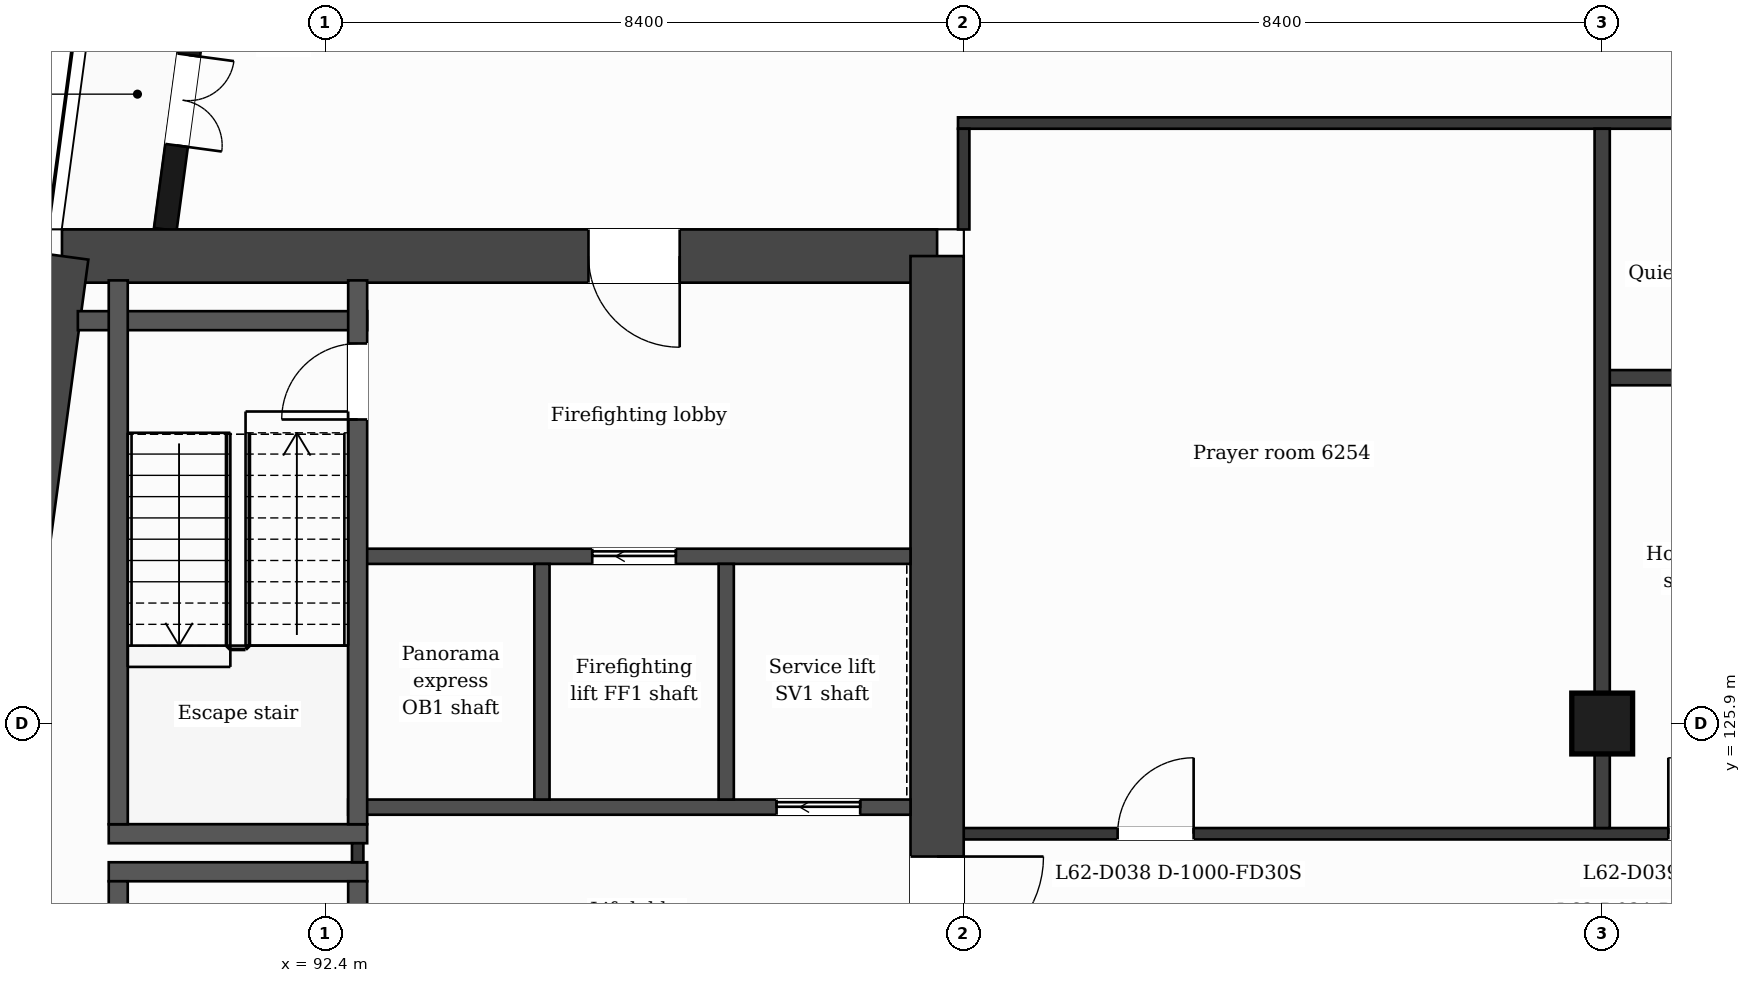
"""IFC4 building model, lengths in metres.
Left out: names, types, materials, properties, quantities, classifications, styles, units other than length and angle.
Written with IfcOpenShell. Run it as: python <this file> out.ifc"""

import sys

from ifc_helpers import new_model, si_unit, direction, frame, frame_2d, origin, origin_2d, place, context, subcontext, project, spatial, rectangle, extrude, element, fill, save


model = new_model("IFC4")
c1 = context("Model", 3, precision=1e-05, world=origin(), true_north=direction((0.0, 1.0)))
c2 = subcontext(c1, "Body", "Model", "MODEL_VIEW")
j1 = project(units=[si_unit("LENGTHUNIT", "METRE"), si_unit("PLANEANGLEUNIT", "RADIAN")], contexts=[c1])
p1 = place(None, origin())
s1 = spatial("IfcSite", under=j1, at=p1, CompositionType="ELEMENT")
p2 = place(p1, origin())
s2 = spatial("IfcBuilding", under=s1, at=p2, CompositionType="ELEMENT")
p3 = place(p2, frame((0.0, 0.0, 259.0)))
s3 = spatial("IfcBuildingStorey", under=s2, at=p3, CompositionType="ELEMENT", Elevation=259.0)
p4 = place(p3, frame((88.937, 132.05, 0.0), z_axis=(0.0, 0.0, 1.0), x_axis=(1.0, 0.0, 0.0)))
e1 = element("IfcWall", 1, at=p4, inside=s3, PredefinedType="SHEAR", context=c2, shape_type="SweptSolid", body=[
    extrude(rectangle(XDim=11.513, YDim=0.7, at=frame_2d((5.757, 0.0))), origin(), (0.0, 0.0, 1.0), 3.7),
])
p5 = place(p4, frame((6.927, 0.0, 0.0)))
e2 = element("IfcOpeningElement", 2, at=p5, cuts=e1, PredefinedType="OPENING", context=c2, shape_type="SweptSolid", body=[
    extrude(rectangle(XDim=1.2, YDim=2.1, at=frame_2d((0.6, 1.05))), frame((0.0, 0.36, 0.0), z_axis=(0.0, -1.0, 0.0), x_axis=(1.0, 0.0, 0.0)), (0.0, 0.0, 1.0), 0.72),
])
p6 = place(p3, frame((100.45, 132.05, 0.0), z_axis=(0.0, 0.0, 1.0), x_axis=(0.0, -1.0, 0.0)))
e3 = element("IfcWall", 3, at=p6, inside=s3, PredefinedType="SHEAR", context=c2, shape_type="SweptSolid", body=[
    extrude(rectangle(XDim=21.3, YDim=0.7, at=frame_2d((10.65, 0.0))), origin(), (0.0, 0.0, 1.0), 3.7),
])
p7 = place(p6, frame((7.9, 0.0, 0.0)))
e4 = element("IfcOpeningElement", 4, at=p7, cuts=e3, PredefinedType="OPENING", context=c2, shape_type="SweptSolid", body=[
    extrude(rectangle(XDim=1.4, YDim=2.1, at=frame_2d((0.7, 1.05))), frame((0.0, 0.36, 0.0), z_axis=(0.0, -1.0, 0.0), x_axis=(1.0, 0.0, 0.0)), (0.0, 0.0, 1.0), 0.72),
])
p8 = place(p3, frame((86.07, 110.75, 0.0), z_axis=(0.0, 0.0, 1.0), x_axis=(0.133406218907, 0.991061441464, 0.0)))
e5 = element("IfcWall", 5, at=p8, inside=s3, PredefinedType="SHEAR", context=c2, shape_type="SweptSolid", body=[
    extrude(rectangle(XDim=21.492, YDim=0.7, at=frame_2d((10.746, 0.0))), origin(), (0.0, 0.0, 1.0), 3.7),
])
p9 = place(p3, frame((109.2, 125.9, 0.0), z_axis=(0.0, 0.0, 1.0), x_axis=(1.0, 0.0, 0.0)))
e6 = element("IfcColumn", 6, at=p9, inside=s3, PredefinedType="COLUMN", context=c2, shape_type="SweptSolid", body=[
    extrude(rectangle(XDim=0.8, YDim=0.8, at=origin_2d()), origin(), (0.0, 0.0, 1.0), 3.7),
])
p10 = place(p3, frame((91.177, 138.95, 0.0), z_axis=(0.0, 0.0, 1.0), x_axis=(-0.133426664613, -0.991058689065, 0.0)))
e7 = element("IfcWall", 7, at=p10, inside=s3, PredefinedType="SOLIDWALL", context=c2, shape_type="SweptSolid", body=[
    extrude(rectangle(XDim=6.609, YDim=0.3, at=frame_2d((3.305, 0.0))), origin(), (0.0, 0.0, 1.0), 3.38),
])
p11 = place(p10, frame((1.039, 0.0, 0.9)))
e8 = element("IfcOpeningElement", 8, at=p11, cuts=e7, PredefinedType="OPENING", context=c2, shape_type="SweptSolid", body=[
    extrude(rectangle(XDim=1.2, YDim=2.1, at=frame_2d((0.6, 1.05))), frame((0.0, 0.16, 0.0), z_axis=(0.0, -1.0, 0.0), x_axis=(1.0, 0.0, 0.0)), (0.0, 0.0, 1.0), 0.32),
])
p12 = place(p10, frame((4.294, 0.0, 0.0)))
e9 = element("IfcOpeningElement", 9, at=p12, cuts=e7, PredefinedType="OPENING", context=c2, shape_type="SweptSolid", body=[
    extrude(rectangle(XDim=1.2, YDim=2.4, at=frame_2d((0.6, 1.2))), frame((0.0, 0.16, 0.0), z_axis=(0.0, -1.0, 0.0), x_axis=(1.0, 0.0, 0.0)), (0.0, 0.0, 1.0), 0.32),
])
for number, where, z_axis, x_axis in (
    (10, (89.552, 123.95, 0.0), (0.0, 0.0, 1.0), (1.0, 0.0, 0.0)),
    (11, (89.552, 124.45, 0.0), (0.0, 0.0, 1.0), (1.0, 0.0, 0.0)),
):
    element("IfcWall", number, at=place(p3, frame(where, z_axis=z_axis, x_axis=x_axis)), inside=s3, PredefinedType="PARTITIONING", context=c2, shape_type="SweptSolid", body=[
        extrude(rectangle(XDim=3.4, YDim=0.25, at=frame_2d((1.7, 0.0))), origin(), (0.0, 0.0, 1.0), 3.38),
    ])
p13 = place(p3, frame((100.8, 124.45, 0.0), z_axis=(0.0, 0.0, 1.0), x_axis=(1.0, 0.0, 0.0)))
e12 = element("IfcWall", 12, at=p13, inside=s3, PredefinedType="PARTITIONING", context=c2, shape_type="SweptSolid", body=[
    extrude(rectangle(XDim=25.2, YDim=0.15, at=frame_2d((12.6, 0.0))), origin(), (0.0, 0.0, 1.0), 3.38),
])
p14 = place(p13, frame((2.025, 0.0, 0.0)))
e13 = element("IfcOpeningElement", 13, at=p14, cuts=e12, PredefinedType="OPENING", context=c2, shape_type="SweptSolid", body=[
    extrude(rectangle(XDim=1.0, YDim=2.1, at=frame_2d((0.5, 1.05))), frame((0.0, 0.085, 0.0), z_axis=(0.0, -1.0, 0.0), x_axis=(1.0, 0.0, 0.0)), (0.0, 0.0, 1.0), 0.17),
])
p15 = place(p13, frame((9.27, 0.0, 0.0)))
e14 = element("IfcOpeningElement", 14, at=p15, cuts=e12, PredefinedType="OPENING", context=c2, shape_type="SweptSolid", body=[
    extrude(rectangle(XDim=1.0, YDim=2.1, at=frame_2d((0.5, 1.05))), frame((0.0, 0.085, 0.0), z_axis=(0.0, -1.0, 0.0), x_axis=(1.0, 0.0, 0.0)), (0.0, 0.0, 1.0), 0.17),
])
p16 = place(p13, frame((13.575, 0.0, 0.0)))
e15 = element("IfcOpeningElement", 15, at=p16, cuts=e12, PredefinedType="OPENING", context=c2, shape_type="SweptSolid", body=[
    extrude(rectangle(XDim=1.0, YDim=2.1, at=frame_2d((0.5, 1.05))), frame((0.0, 0.085, 0.0), z_axis=(0.0, -1.0, 0.0), x_axis=(1.0, 0.0, 0.0)), (0.0, 0.0, 1.0), 0.17),
])
p17 = place(p13, frame((21.17, 0.0, 0.0)))
e16 = element("IfcOpeningElement", 16, at=p17, cuts=e12, PredefinedType="OPENING", context=c2, shape_type="SweptSolid", body=[
    extrude(rectangle(XDim=1.0, YDim=2.1, at=frame_2d((0.5, 1.05))), frame((0.0, 0.085, 0.0), z_axis=(0.0, -1.0, 0.0), x_axis=(1.0, 0.0, 0.0)), (0.0, 0.0, 1.0), 0.17),
])
p18 = place(p3, frame((92.702, 124.8, 0.0), z_axis=(0.0, 0.0, 1.0), x_axis=(1.0, 0.0, 0.0)))
e17 = element("IfcWall", 17, at=p18, inside=s3, PredefinedType="PARTITIONING", context=c2, shape_type="SweptSolid", body=[
    extrude(rectangle(XDim=7.398, YDim=0.2, at=frame_2d((3.699, 0.0))), origin(), (0.0, 0.0, 1.0), 3.38),
])
p19 = place(p18, frame((5.636, 0.0, 0.0)))
e18 = element("IfcOpeningElement", 18, at=p19, cuts=e17, PredefinedType="OPENING", context=c2, shape_type="SweptSolid", body=[
    extrude(rectangle(XDim=1.1, YDim=2.1, at=frame_2d((0.55, 1.05))), frame((0.0, 0.11, 0.0), z_axis=(0.0, -1.0, 0.0), x_axis=(1.0, 0.0, 0.0)), (0.0, 0.0, 1.0), 0.22),
])
p20 = place(p3, frame((92.827, 128.1, 0.0), z_axis=(0.0, 0.0, 1.0), x_axis=(1.0, 0.0, 0.0)))
e19 = element("IfcWall", 19, at=p20, inside=s3, PredefinedType="PARTITIONING", context=c2, shape_type="SweptSolid", body=[
    extrude(rectangle(XDim=7.273, YDim=0.2, at=frame_2d((3.637, 0.0))), origin(), (0.0, 0.0, 1.0), 3.38),
])
p21 = place(p20, frame((3.086, 0.0, 0.0)))
e20 = element("IfcOpeningElement", 20, at=p21, cuts=e19, PredefinedType="OPENING", context=c2, shape_type="SweptSolid", body=[
    extrude(rectangle(XDim=1.1, YDim=2.1, at=frame_2d((0.55, 1.05))), frame((0.0, 0.11, 0.0), z_axis=(0.0, -1.0, 0.0), x_axis=(1.0, 0.0, 0.0)), (0.0, 0.0, 1.0), 0.22),
])
p22 = place(p3, frame((109.2, 130.45, 0.0), z_axis=(0.0, 0.0, 1.0), x_axis=(1.0, 0.0, 0.0)))
e21 = element("IfcWall", 21, at=p22, inside=s3, PredefinedType="PARTITIONING", context=c2, shape_type="SweptSolid", body=[
    extrude(rectangle(XDim=3.1, YDim=0.2, at=frame_2d((1.55, 0.0))), origin(), (0.0, 0.0, 1.0), 3.38),
])
p23 = place(p3, frame((89.146, 131.2, 0.0), z_axis=(0.0, 0.0, 1.0), x_axis=(1.0, 0.0, 0.0)))
e22 = element("IfcWall", 22, at=p23, inside=s3, PredefinedType="PARTITIONING", context=c2, shape_type="SweptSolid", body=[
    extrude(rectangle(XDim=3.806, YDim=0.25, at=frame_2d((1.903, 0.0))), origin(), (0.0, 0.0, 1.0), 3.38),
])
p24 = place(p3, frame((100.725, 133.8, 0.0), z_axis=(0.0, 0.0, 1.0), x_axis=(1.0, 0.0, 0.0)))
e23 = element("IfcWall", 23, at=p24, inside=s3, PredefinedType="PARTITIONING", context=c2, shape_type="SweptSolid", body=[
    extrude(rectangle(XDim=25.35, YDim=0.15, at=frame_2d((12.675, 0.0))), origin(), (0.0, 0.0, 1.0), 3.38),
])
p25 = place(p24, frame((10.7, 0.0, 0.0)))
e24 = element("IfcOpeningElement", 24, at=p25, cuts=e23, PredefinedType="OPENING", context=c2, shape_type="SweptSolid", body=[
    extrude(rectangle(XDim=1.0, YDim=2.1, at=frame_2d((0.5, 1.05))), frame((0.0, 0.085, 0.0), z_axis=(0.0, -1.0, 0.0), x_axis=(1.0, 0.0, 0.0)), (0.0, 0.0, 1.0), 0.17),
])
for number, where, z_axis, x_axis in (
    (25, (89.677, 116.67, 0.0), (0.0, 0.0, 1.0), (0.0, 1.0, 0.0)),
    (26, (89.677, 124.575, 0.0), (0.0, 0.0, 1.0), (0.0, 1.0, 0.0)),
):
    element("IfcWall", number, at=place(p3, frame(where, z_axis=z_axis, x_axis=x_axis)), inside=s3, PredefinedType="PARTITIONING", context=c2, shape_type="SweptSolid", body=[
        extrude(rectangle(XDim=7.155, YDim=0.25, at=frame_2d((3.578, 0.0))), origin(), (0.0, 0.0, 1.0), 3.38),
    ])
p26 = place(p3, frame((92.827, 124.075, 0.0), z_axis=(0.0, 0.0, 1.0), x_axis=(0.0, 1.0, 0.0)))
e27 = element("IfcWall", 27, at=p26, inside=s3, PredefinedType="PARTITIONING", context=c2, shape_type="SweptSolid", body=[
    extrude(rectangle(XDim=0.25, YDim=0.15, at=frame_2d((0.125, 0.0))), origin(), (0.0, 0.0, 1.0), 3.38),
])
p27 = place(p3, frame((92.827, 116.67, 0.0), z_axis=(0.0, 0.0, 1.0), x_axis=(0.0, 1.0, 0.0)))
e28 = element("IfcWall", 28, at=p27, inside=s3, PredefinedType="PARTITIONING", context=c2, shape_type="SweptSolid", body=[
    extrude(rectangle(XDim=7.155, YDim=0.25, at=frame_2d((3.578, 0.0))), origin(), (0.0, 0.0, 1.0), 3.38),
])
p28 = place(p27, frame((5.855, 0.0, 0.0)))
e29 = element("IfcOpeningElement", 29, at=p28, cuts=e28, PredefinedType="OPENING", context=c2, shape_type="SweptSolid", body=[
    extrude(rectangle(XDim=0.95, YDim=2.1, at=frame_2d((0.475, 1.05))), frame((0.0, 0.135, 0.0), z_axis=(0.0, -1.0, 0.0), x_axis=(1.0, 0.0, 0.0)), (0.0, 0.0, 1.0), 0.27),
])
p29 = place(p3, frame((92.827, 124.575, 0.0), z_axis=(0.0, 0.0, 1.0), x_axis=(0.0, 1.0, 0.0)))
e30 = element("IfcWall", 30, at=p29, inside=s3, PredefinedType="PARTITIONING", context=c2, shape_type="SweptSolid", body=[
    extrude(rectangle(XDim=7.155, YDim=0.25, at=frame_2d((3.578, 0.0))), origin(), (0.0, 0.0, 1.0), 3.38),
])
p30 = place(p29, frame((5.325, 0.0, 0.0)))
e31 = element("IfcOpeningElement", 31, at=p30, cuts=e30, PredefinedType="OPENING", context=c2, shape_type="SweptSolid", body=[
    extrude(rectangle(XDim=1.0, YDim=2.1, at=frame_2d((0.5, 1.05))), frame((0.0, 0.135, 0.0), z_axis=(0.0, -1.0, 0.0), x_axis=(1.0, 0.0, 0.0)), (0.0, 0.0, 1.0), 0.27),
])
for number, where, z_axis, x_axis in (
    (32, (95.251, 124.9, 0.0), (0.0, 0.0, 1.0), (0.0, 1.0, 0.0)),
    (33, (97.676, 124.9, 0.0), (0.0, 0.0, 1.0), (0.0, 1.0, 0.0)),
):
    element("IfcWall", number, at=place(p3, frame(where, z_axis=z_axis, x_axis=x_axis)), inside=s3, PredefinedType="PARTITIONING", context=c2, shape_type="SweptSolid", body=[
        extrude(rectangle(XDim=3.1, YDim=0.2, at=frame_2d((1.55, 0.0))), origin(), (0.0, 0.0, 1.0), 3.38),
    ])
p31 = place(p3, frame((100.8, 132.4, 0.0), z_axis=(0.0, 0.0, 1.0), x_axis=(0.0, 1.0, 0.0)))
e34 = element("IfcWall", 34, at=p31, inside=s3, PredefinedType="PARTITIONING", context=c2, shape_type="SweptSolid", body=[
    extrude(rectangle(XDim=1.325, YDim=0.15, at=frame_2d((0.663, 0.0))), origin(), (0.0, 0.0, 1.0), 3.38),
])
p32 = place(p3, frame((109.2, 124.525, 0.0), z_axis=(0.0, 0.0, 1.0), x_axis=(0.0, 1.0, 0.0)))
e35 = element("IfcWall", 35, at=p32, inside=s3, PredefinedType="PARTITIONING", context=c2, shape_type="SweptSolid", body=[
    extrude(rectangle(XDim=9.2, YDim=0.2, at=frame_2d((4.6, 0.0))), origin(), (0.0, 0.0, 1.0), 3.38),
])
p33 = place(p12, origin())
e36 = element("IfcDoor", 36, at=p33, inside=s3, OperationType="DOUBLE_DOOR_SINGLE_SWING", PredefinedType="DOOR", context=c2, shape_type="SweptSolid", body=[
    extrude(rectangle(XDim=1.2, YDim=2.4, at=frame_2d((0.6, 1.2))), frame((0.0, 0.025, 0.0), z_axis=(0.0, -1.0, 0.0), x_axis=(1.0, 0.0, 0.0)), (0.0, 0.0, 1.0), 0.05),
])
fill(e9, e36)
p34 = place(p21, origin())
e37 = element("IfcDoor", 37, at=p34, inside=s3, OperationType="SLIDING_TO_LEFT", PredefinedType="DOOR", context=c2, shape_type="SweptSolid", body=[
    extrude(rectangle(XDim=1.1, YDim=2.1, at=frame_2d((0.55, 1.05))), frame((0.0, 0.025, 0.0), z_axis=(0.0, -1.0, 0.0), x_axis=(1.0, 0.0, 0.0)), (0.0, 0.0, 1.0), 0.05),
])
fill(e20, e37)
p35 = place(p19, origin())
e38 = element("IfcDoor", 38, at=p35, inside=s3, OperationType="SLIDING_TO_LEFT", PredefinedType="DOOR", context=c2, shape_type="SweptSolid", body=[
    extrude(rectangle(XDim=1.1, YDim=2.1, at=frame_2d((0.55, 1.05))), frame((0.0, 0.025, 0.0), z_axis=(0.0, -1.0, 0.0), x_axis=(1.0, 0.0, 0.0)), (0.0, 0.0, 1.0), 0.05),
])
fill(e18, e38)
p36 = place(p30, origin())
e39 = element("IfcDoor", 39, at=p36, inside=s3, OperationType="SINGLE_SWING_LEFT", PredefinedType="DOOR", context=c2, shape_type="SweptSolid", body=[
    extrude(rectangle(XDim=1.0, YDim=2.1, at=frame_2d((0.5, 1.05))), frame((0.0, 0.025, 0.0), z_axis=(0.0, -1.0, 0.0), x_axis=(1.0, 0.0, 0.0)), (0.0, 0.0, 1.0), 0.05),
])
fill(e31, e39)
p37 = place(p14, origin())
e40 = element("IfcDoor", 40, at=p37, inside=s3, OperationType="SINGLE_SWING_RIGHT", PredefinedType="DOOR", context=c2, shape_type="SweptSolid", body=[
    extrude(rectangle(XDim=1.0, YDim=2.1, at=frame_2d((0.5, 1.05))), frame((0.0, 0.025, 0.0), z_axis=(0.0, -1.0, 0.0), x_axis=(1.0, 0.0, 0.0)), (0.0, 0.0, 1.0), 0.05),
])
fill(e13, e40)
p38 = place(p15, origin())
e41 = element("IfcDoor", 41, at=p38, inside=s3, OperationType="SINGLE_SWING_LEFT", PredefinedType="DOOR", context=c2, shape_type="SweptSolid", body=[
    extrude(rectangle(XDim=1.0, YDim=2.1, at=frame_2d((0.5, 1.05))), frame((0.0, 0.025, 0.0), z_axis=(0.0, -1.0, 0.0), x_axis=(1.0, 0.0, 0.0)), (0.0, 0.0, 1.0), 0.05),
])
fill(e14, e41)
p39 = place(p5, origin())
e42 = element("IfcDoor", 42, at=p39, inside=s3, OperationType="SINGLE_SWING_RIGHT", PredefinedType="DOOR", context=c2, shape_type="SweptSolid", body=[
    extrude(rectangle(XDim=1.2, YDim=2.1, at=frame_2d((0.6, 1.05))), frame((0.0, 0.025, 0.0), z_axis=(0.0, -1.0, 0.0), x_axis=(1.0, 0.0, 0.0)), (0.0, 0.0, 1.0), 0.05),
])
fill(e2, e42)
p40 = place(p7, origin())
e43 = element("IfcDoor", 43, at=p40, inside=s3, OperationType="SINGLE_SWING_LEFT", PredefinedType="DOOR", context=c2, shape_type="SweptSolid", body=[
    extrude(rectangle(XDim=1.4, YDim=2.1, at=frame_2d((0.7, 1.05))), frame((0.0, 0.025, 0.0), z_axis=(0.0, -1.0, 0.0), x_axis=(1.0, 0.0, 0.0)), (0.0, 0.0, 1.0), 0.05),
])
fill(e4, e43)
save(model, sys.argv[1])
